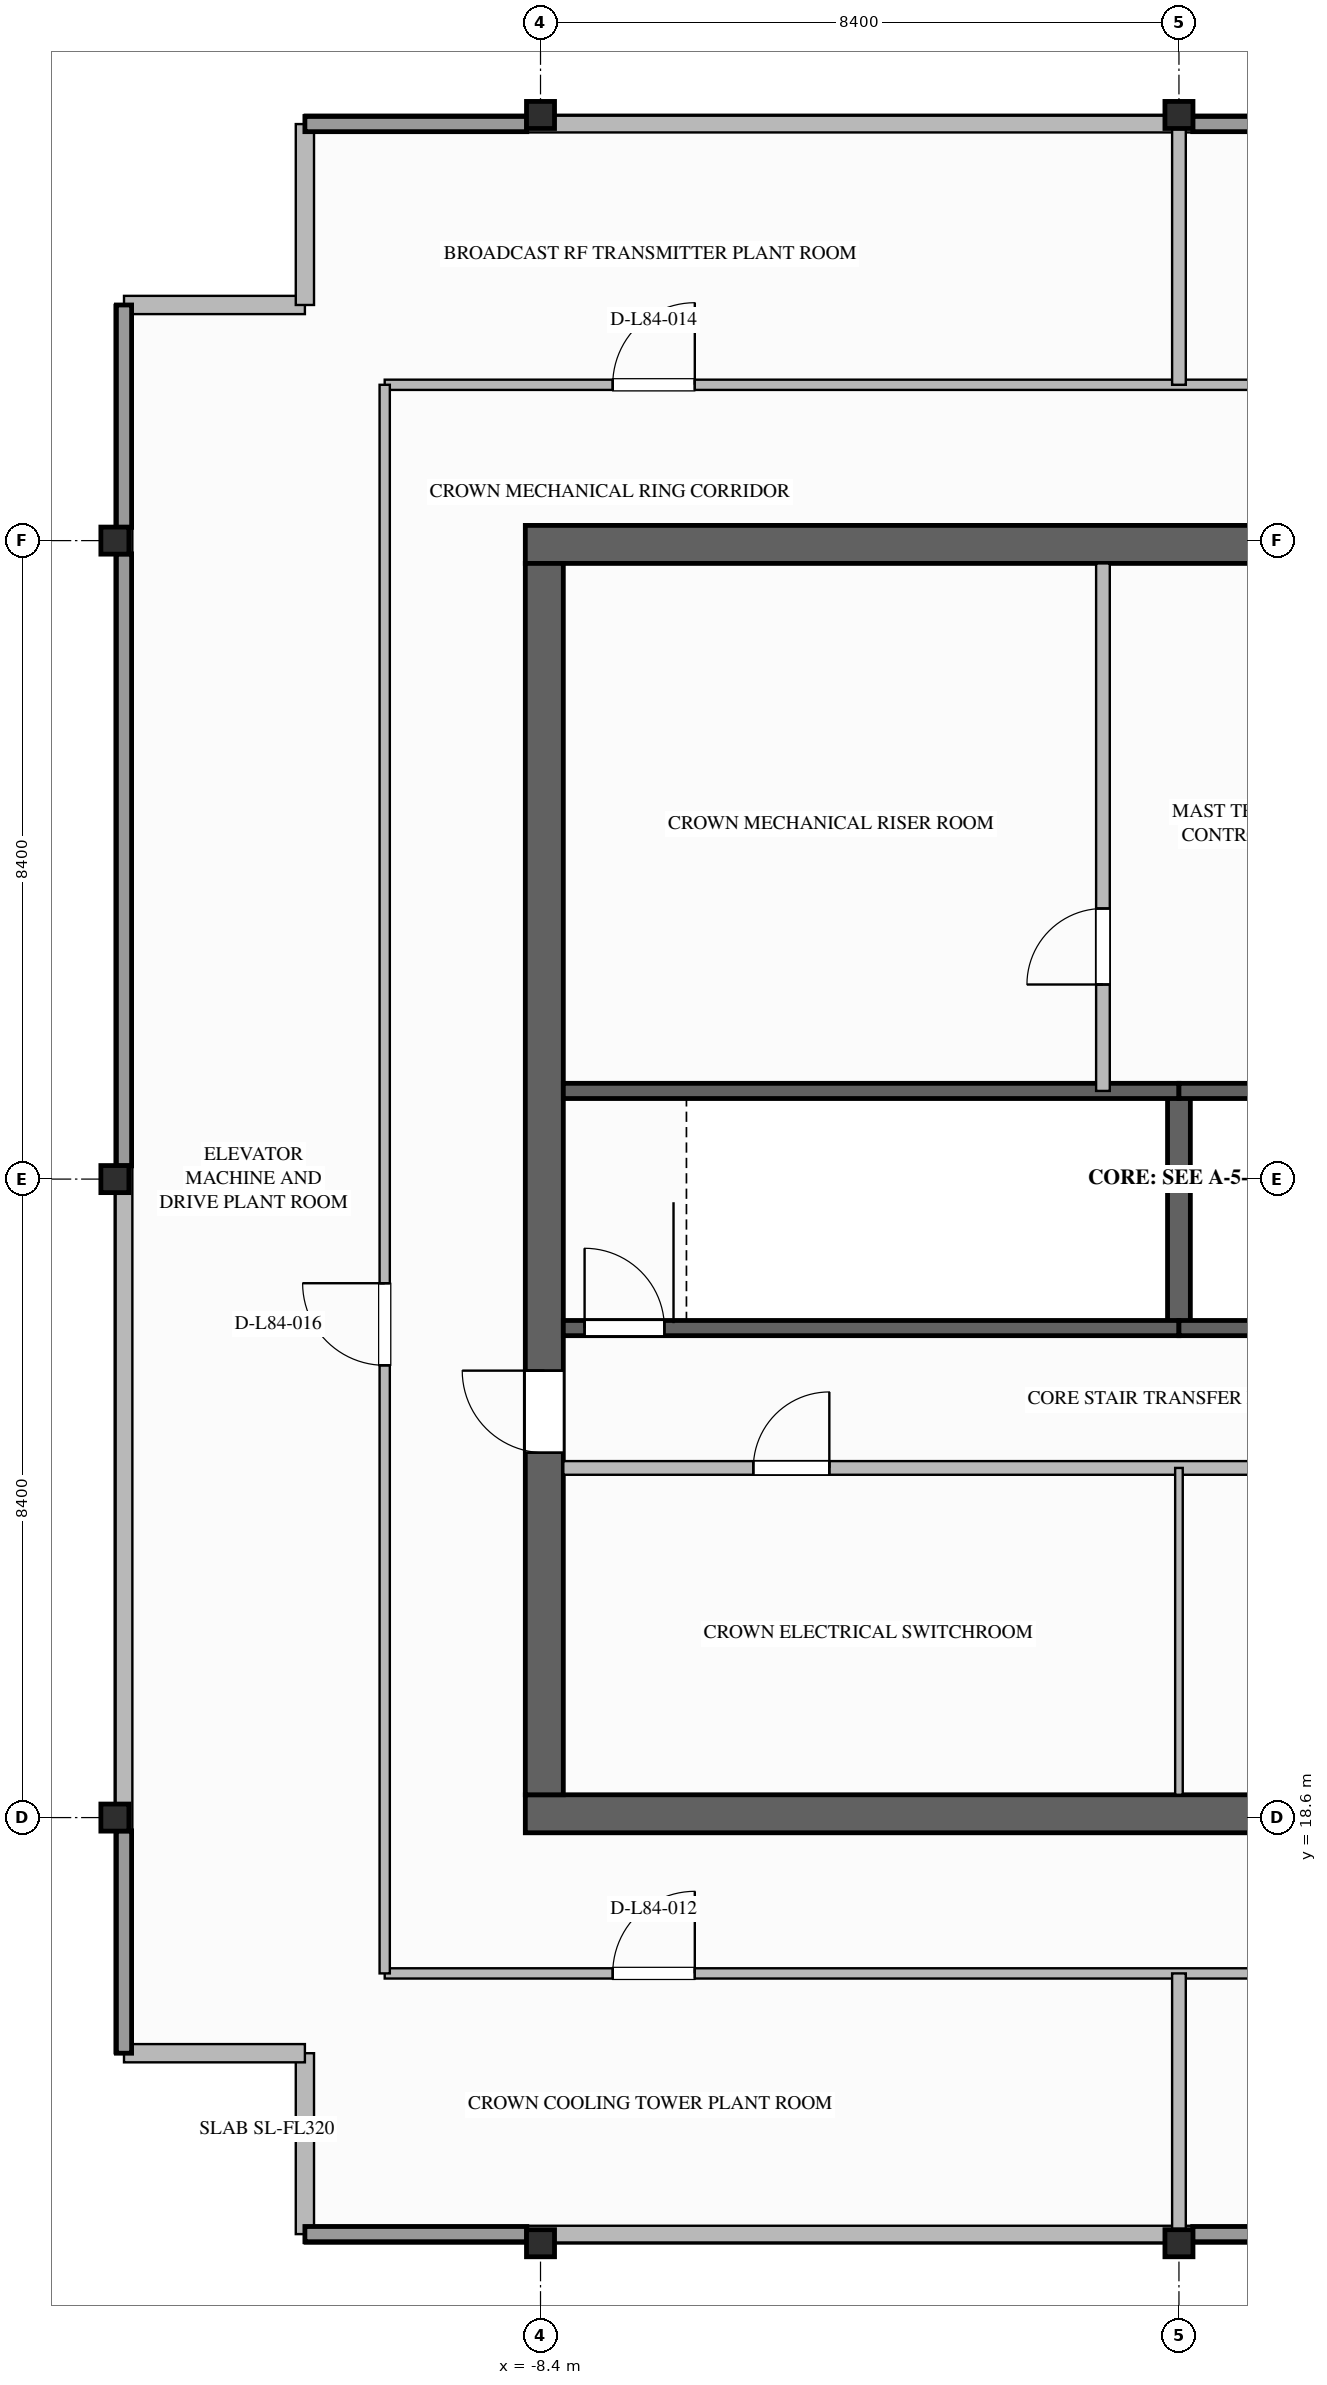
"""IFC4 building model, lengths in metres.
Left out: names, types, materials, properties, quantities, classifications, styles, units other than length and angle.
Written with IfcOpenShell. Run it as: python <this file> out.ifc"""

import sys

from ifc_helpers import new_model, si_unit, direction, frame, frame_2d, origin, origin_2d, place, context, subcontext, project, spatial, rectangle, i_section, extrude, element, fill, save


model = new_model("IFC4")
c1 = context("Model", 3, precision=1e-05, world=origin(), true_north=direction((0.0, 1.0)))
c2 = subcontext(c1, "Body", "Model", "MODEL_VIEW")
j1 = project(units=[si_unit("LENGTHUNIT", "METRE"), si_unit("PLANEANGLEUNIT", "RADIAN")], contexts=[c1])
p1 = place(None, origin())
s1 = spatial("IfcSite", under=j1, at=p1, CompositionType="ELEMENT")
p2 = place(p1, origin())
s2 = spatial("IfcBuilding", under=s1, at=p2, CompositionType="ELEMENT")
p3 = place(p2, frame((0.0, 0.0, 323.2)))
s3 = spatial("IfcBuildingStorey", under=s2, at=p3, CompositionType="ELEMENT", Elevation=323.2)
for number, where, z_axis, x_axis in (
    (1, (-8.6, 35.35, 0.0), (0.0, 0.0, 1.0), (1.0, 0.0, 0.0)),
    (2, (8.6, 18.65, 0.0), (0.0, 0.0, 1.0), (-1.0, 0.0, 0.0)),
):
    element("IfcWall", number, at=place(p3, frame(where, z_axis=z_axis, x_axis=x_axis)), inside=s3, PredefinedType="SHEAR", context=c2, shape_type="SweptSolid", body=[
        extrude(rectangle(XDim=17.2, YDim=0.5, at=frame_2d((8.6, 0.0))), origin(), (0.0, 0.0, 1.0), 3.42),
    ])
p4 = place(p3, frame((-8.35, 18.9, 0.0), z_axis=(0.0, 0.0, 1.0), x_axis=(0.0, 1.0, 0.0)))
e3 = element("IfcWall", 3, at=p4, inside=s3, PredefinedType="SHEAR", context=c2, shape_type="SweptSolid", body=[
    extrude(rectangle(XDim=16.2, YDim=0.5, at=frame_2d((8.1, 0.0))), origin(), (0.0, 0.0, 1.0), 3.42),
])
p5 = place(p4, frame((4.5, 0.0, 0.0)))
e4 = element("IfcOpeningElement", 4, at=p5, cuts=e3, PredefinedType="OPENING", context=c2, shape_type="SweptSolid", body=[
    extrude(rectangle(XDim=1.08, YDim=2.04, at=frame_2d((0.54, 1.02))), frame((0.0, 0.26, 0.0), z_axis=(0.0, -1.0, 0.0), x_axis=(1.0, 0.0, 0.0)), (0.0, 0.0, 1.0), 0.52),
])
for number, where, z_axis, x_axis in (
    (5, (-14.0, 18.6, 0.0), (0.0, 0.0, 1.0), (1.0, 0.0, 0.0)),
    (6, (-14.0, 27.0, 0.0), (0.0, 0.0, 1.0), (1.0, 0.0, 0.0)),
    (7, (-14.0, 35.4, 0.0), (0.0, 0.0, 1.0), (1.0, 0.0, 0.0)),
    (8, (-8.4, 13.0, 0.0), (0.0, 0.0, 1.0), (1.0, 0.0, 0.0)),
    (9, (0.0, 13.0, 0.0), (0.0, 0.0, 1.0), (1.0, 0.0, 0.0)),
    (10, (-8.4, 41.0, 0.0), (0.0, 0.0, 1.0), (1.0, 0.0, 0.0)),
    (11, (0.0, 41.0, 0.0), (0.0, 0.0, 1.0), (1.0, 0.0, 0.0)),
):
    element("IfcColumn", number, at=place(p3, frame(where, z_axis=z_axis, x_axis=x_axis)), inside=s3, PredefinedType="COLUMN", context=c2, shape_type="SweptSolid", body=[
        extrude(i_section(OverallWidth=0.369, OverallDepth=0.356, WebThickness=0.011, FlangeThickness=0.018, FilletRadius=0.025, at=origin_2d()), origin(), (0.0, 0.0, 1.0), 3.42),
    ])
for number, where, z_axis, x_axis in (
    (12, (-11.5, 13.12, 0.0), (0.0, 0.0, 1.0), (0.0, 1.0, 0.0)),
    (13, (-11.5, 15.5, 0.0), (0.0, 0.0, 1.0), (-1.0, 0.0, 0.0)),
    (14, (-13.88, 38.5, 0.0), (0.0, 0.0, 1.0), (1.0, 0.0, 0.0)),
    (15, (-11.5, 38.5, 0.0), (0.0, 0.0, 1.0), (0.0, 1.0, 0.0)),
):
    element("IfcWall", number, at=place(p3, frame(where, z_axis=z_axis, x_axis=x_axis)), inside=s3, PredefinedType="STANDARD", context=c2, shape_type="SweptSolid", body=[
        extrude(rectangle(XDim=2.38, YDim=0.24, at=frame_2d((1.19, 0.0))), origin(), (0.0, 0.0, 1.0), 3.42),
    ])
for number, where, z_axis, x_axis in (
    (16, (11.5, 13.12, 3.8), (0.0, 0.0, 1.0), (-1.0, 0.0, 0.0)),
    (17, (-13.88, 15.5, 3.8), (0.0, 0.0, 1.0), (0.0, 1.0, 0.0)),
    (18, (-11.5, 40.88, 3.8), (0.0, 0.0, 1.0), (1.0, 0.0, 0.0)),
):
    element("IfcWall", number, at=place(p3, frame(where, z_axis=z_axis, x_axis=x_axis)), inside=s3, PredefinedType="PARAPET", context=c2, shape_type="SweptSolid", body=[
        extrude(rectangle(XDim=23.0, YDim=0.22, at=frame_2d((11.5, 0.0))), origin(), (0.0, 0.0, 1.0), 0.95),
    ])
p6 = place(p3, frame((0.0, 25.04, 0.0), z_axis=(0.0, 0.0, 1.0), x_axis=(0.0, 1.0, 0.0)))
e19 = element("IfcWall", 19, at=p6, inside=s3, PredefinedType="SOLIDWALL", context=c2, shape_type="SweptSolid", body=[
    extrude(rectangle(XDim=3.12, YDim=0.3, at=frame_2d((1.56, 0.0))), origin(), (0.0, 0.0, 1.0), 3.42),
])
p7 = place(p3, frame((-8.1, 25.04, 0.0), z_axis=(0.0, 0.0, 1.0), x_axis=(1.0, 0.0, 0.0)))
e20 = element("IfcWall", 20, at=p7, inside=s3, PredefinedType="SOLIDWALL", context=c2, shape_type="SweptSolid", body=[
    extrude(rectangle(XDim=8.1, YDim=0.2, at=frame_2d((4.05, 0.0))), origin(), (0.0, 0.0, 1.0), 3.42),
])
p8 = place(p7, frame((0.28, 0.0, 0.0)))
e21 = element("IfcOpeningElement", 21, at=p8, cuts=e20, PredefinedType="OPENING", context=c2, shape_type="SweptSolid", body=[
    extrude(rectangle(XDim=1.05, YDim=2.1, at=frame_2d((0.525, 1.05))), frame((0.0, 0.11, 0.0), z_axis=(0.0, -1.0, 0.0), x_axis=(1.0, 0.0, 0.0)), (0.0, 0.0, 1.0), 0.22),
])
for number, where, z_axis, x_axis in (
    (22, (-8.1, 28.16, 0.0), (0.0, 0.0, 1.0), (1.0, 0.0, 0.0)),
    (23, (0.0, 25.04, 0.0), (0.0, 0.0, 1.0), (1.0, 0.0, 0.0)),
):
    element("IfcWall", number, at=place(p3, frame(where, z_axis=z_axis, x_axis=x_axis)), inside=s3, PredefinedType="SOLIDWALL", context=c2, shape_type="SweptSolid", body=[
        extrude(rectangle(XDim=8.1, YDim=0.2, at=frame_2d((4.05, 0.0))), origin(), (0.0, 0.0, 1.0), 3.42),
    ])
p9 = place(p3, frame((8.1, 28.16, 0.0), z_axis=(0.0, 0.0, 1.0), x_axis=(-1.0, 0.0, 0.0)))
e24 = element("IfcWall", 24, at=p9, inside=s3, PredefinedType="SOLIDWALL", context=c2, shape_type="SweptSolid", body=[
    extrude(rectangle(XDim=8.1, YDim=0.2, at=frame_2d((4.05, 0.0))), origin(), (0.0, 0.0, 1.0), 3.42),
])
p10 = place(p9, frame((0.28, 0.0, 0.0)))
e25 = element("IfcOpeningElement", 25, at=p10, cuts=e24, PredefinedType="OPENING", context=c2, shape_type="SweptSolid", body=[
    extrude(rectangle(XDim=1.05, YDim=2.1, at=frame_2d((0.525, 1.05))), frame((0.0, 0.11, 0.0), z_axis=(0.0, -1.0, 0.0), x_axis=(1.0, 0.0, 0.0)), (0.0, 0.0, 1.0), 0.22),
])
p11 = place(p3, frame((-1.0, 28.16, 0.0), z_axis=(0.0, 0.0, 1.0), x_axis=(0.0, 1.0, 0.0)))
e26 = element("IfcWall", 26, at=p11, inside=s3, PredefinedType="SOLIDWALL", context=c2, shape_type="SweptSolid", body=[
    extrude(rectangle(XDim=6.94, YDim=0.18, at=frame_2d((3.47, 0.0))), origin(), (0.0, 0.0, 1.0), 3.42),
])
p12 = place(p11, frame((1.4, 0.0, 0.0)))
e27 = element("IfcOpeningElement", 27, at=p12, cuts=e26, PredefinedType="OPENING", context=c2, shape_type="SweptSolid", body=[
    extrude(rectangle(XDim=1.0, YDim=2.1, at=frame_2d((0.5, 1.05))), frame((0.0, 0.1, 0.0), z_axis=(0.0, -1.0, 0.0), x_axis=(1.0, 0.0, 0.0)), (0.0, 0.0, 1.0), 0.2),
])
p13 = place(p3, frame((-8.1, 23.2, 0.0), z_axis=(0.0, 0.0, 1.0), x_axis=(1.0, 0.0, 0.0)))
e28 = element("IfcWall", 28, at=p13, inside=s3, PredefinedType="SOLIDWALL", context=c2, shape_type="SweptSolid", body=[
    extrude(rectangle(XDim=16.2, YDim=0.18, at=frame_2d((8.1, 0.0))), origin(), (0.0, 0.0, 1.0), 2.368),
])
p14 = place(p13, frame((2.5, 0.0, 0.0)))
e29 = element("IfcOpeningElement", 29, at=p14, cuts=e28, PredefinedType="OPENING", context=c2, shape_type="SweptSolid", body=[
    extrude(rectangle(XDim=1.0, YDim=2.1, at=frame_2d((0.5, 1.05))), frame((0.0, 0.1, 0.0), z_axis=(0.0, -1.0, 0.0), x_axis=(1.0, 0.0, 0.0)), (0.0, 0.0, 1.0), 0.2),
])
p15 = place(p13, frame((11.0, 0.0, 0.0)))
e30 = element("IfcOpeningElement", 30, at=p15, cuts=e28, PredefinedType="OPENING", context=c2, shape_type="SweptSolid", body=[
    extrude(rectangle(XDim=1.0, YDim=2.1, at=frame_2d((0.5, 1.05))), frame((0.0, 0.1, 0.0), z_axis=(0.0, -1.0, 0.0), x_axis=(1.0, 0.0, 0.0)), (0.0, 0.0, 1.0), 0.2),
])
p16 = place(p3, frame((0.0, 18.9, 0.0), z_axis=(0.0, 0.0, 1.0), x_axis=(0.0, 1.0, 0.0)))
e31 = element("IfcWall", 31, at=p16, inside=s3, PredefinedType="PARTITIONING", context=c2, shape_type="SweptSolid", body=[
    extrude(rectangle(XDim=4.3, YDim=0.1, at=frame_2d((2.15, 0.0))), origin(), (0.0, 0.0, 1.0), 3.42),
])
p17 = place(p3, frame((-10.45, 16.55, 0.0), z_axis=(0.0, 0.0, 1.0), x_axis=(1.0, 0.0, 0.0)))
e32 = element("IfcWall", 32, at=p17, inside=s3, PredefinedType="PARTITIONING", context=c2, shape_type="SweptSolid", body=[
    extrude(rectangle(XDim=20.9, YDim=0.135, at=frame_2d((10.45, 0.0))), origin(), (0.0, 0.0, 1.0), 3.42),
])
p18 = place(p17, frame((3.0, 0.0, 0.0)))
e33 = element("IfcOpeningElement", 33, at=p18, cuts=e32, PredefinedType="OPENING", context=c2, shape_type="SweptSolid", body=[
    extrude(rectangle(XDim=1.08, YDim=2.04, at=frame_2d((0.54, 1.02))), frame((0.0, 0.077, 0.0), z_axis=(0.0, -1.0, 0.0), x_axis=(1.0, 0.0, 0.0)), (0.0, 0.0, 1.0), 0.155),
])
p19 = place(p17, frame((15.0, 0.0, 0.0)))
e34 = element("IfcOpeningElement", 34, at=p19, cuts=e32, PredefinedType="OPENING", context=c2, shape_type="SweptSolid", body=[
    extrude(rectangle(XDim=1.08, YDim=2.04, at=frame_2d((0.54, 1.02))), frame((0.0, 0.077, 0.0), z_axis=(0.0, -1.0, 0.0), x_axis=(1.0, 0.0, 0.0)), (0.0, 0.0, 1.0), 0.155),
])
p20 = place(p3, frame((-10.45, 37.45, 0.0), z_axis=(0.0, 0.0, 1.0), x_axis=(1.0, 0.0, 0.0)))
e35 = element("IfcWall", 35, at=p20, inside=s3, PredefinedType="PARTITIONING", context=c2, shape_type="SweptSolid", body=[
    extrude(rectangle(XDim=20.9, YDim=0.135, at=frame_2d((10.45, 0.0))), origin(), (0.0, 0.0, 1.0), 3.42),
])
p21 = place(p20, frame((3.0, 0.0, 0.0)))
e36 = element("IfcOpeningElement", 36, at=p21, cuts=e35, PredefinedType="OPENING", context=c2, shape_type="SweptSolid", body=[
    extrude(rectangle(XDim=1.08, YDim=2.04, at=frame_2d((0.54, 1.02))), frame((0.0, 0.077, 0.0), z_axis=(0.0, -1.0, 0.0), x_axis=(1.0, 0.0, 0.0)), (0.0, 0.0, 1.0), 0.155),
])
p22 = place(p20, frame((15.0, 0.0, 0.0)))
e37 = element("IfcOpeningElement", 37, at=p22, cuts=e35, PredefinedType="OPENING", context=c2, shape_type="SweptSolid", body=[
    extrude(rectangle(XDim=1.08, YDim=2.04, at=frame_2d((0.54, 1.02))), frame((0.0, 0.077, 0.0), z_axis=(0.0, -1.0, 0.0), x_axis=(1.0, 0.0, 0.0)), (0.0, 0.0, 1.0), 0.155),
])
p23 = place(p3, frame((-10.45, 16.55, 0.0), z_axis=(0.0, 0.0, 1.0), x_axis=(0.0, 1.0, 0.0)))
e38 = element("IfcWall", 38, at=p23, inside=s3, PredefinedType="PARTITIONING", context=c2, shape_type="SweptSolid", body=[
    extrude(rectangle(XDim=20.9, YDim=0.135, at=frame_2d((10.45, 0.0))), origin(), (0.0, 0.0, 1.0), 3.42),
])
p24 = place(p23, frame((8.0, 0.0, 0.0)))
e39 = element("IfcOpeningElement", 39, at=p24, cuts=e38, PredefinedType="OPENING", context=c2, shape_type="SweptSolid", body=[
    extrude(rectangle(XDim=1.08, YDim=2.04, at=frame_2d((0.54, 1.02))), frame((0.0, 0.077, 0.0), z_axis=(0.0, -1.0, 0.0), x_axis=(1.0, 0.0, 0.0)), (0.0, 0.0, 1.0), 0.155),
])
for number, where, z_axis, x_axis in (
    (40, (0.0, 13.12, 0.0), (0.0, 0.0, 1.0), (0.0, 1.0, 0.0)),
    (41, (0.0, 37.45, 0.0), (0.0, 0.0, 1.0), (0.0, 1.0, 0.0)),
):
    element("IfcWall", number, at=place(p3, frame(where, z_axis=z_axis, x_axis=x_axis)), inside=s3, PredefinedType="SOLIDWALL", context=c2, shape_type="SweptSolid", body=[
        extrude(rectangle(XDim=3.43, YDim=0.18, at=frame_2d((1.715, 0.0))), origin(), (0.0, 0.0, 1.0), 2.868),
    ])
p25 = place(p8, origin())
e42 = element("IfcDoor", 42, at=p25, inside=s3, OperationType="SINGLE_SWING_LEFT", PredefinedType="DOOR", context=c2, shape_type="SweptSolid", body=[
    extrude(rectangle(XDim=1.05, YDim=2.1, at=frame_2d((0.525, 1.05))), frame((0.0, 0.025, 0.0), z_axis=(0.0, -1.0, 0.0), x_axis=(1.0, 0.0, 0.0)), (0.0, 0.0, 1.0), 0.05),
])
fill(e21, e42)
p26 = place(p12, origin())
e43 = element("IfcDoor", 43, at=p26, inside=s3, OperationType="SINGLE_SWING_LEFT", PredefinedType="DOOR", context=c2, shape_type="SweptSolid", body=[
    extrude(rectangle(XDim=1.0, YDim=2.1, at=frame_2d((0.5, 1.05))), frame((0.0, 0.025, 0.0), z_axis=(0.0, -1.0, 0.0), x_axis=(1.0, 0.0, 0.0)), (0.0, 0.0, 1.0), 0.05),
])
fill(e27, e43)
p27 = place(p5, origin())
e44 = element("IfcDoor", 44, at=p27, inside=s3, OperationType="SINGLE_SWING_RIGHT", PredefinedType="DOOR", context=c2, shape_type="SweptSolid", body=[
    extrude(rectangle(XDim=1.08, YDim=2.04, at=frame_2d((0.54, 1.02))), frame((0.0, 0.025, 0.0), z_axis=(0.0, -1.0, 0.0), x_axis=(1.0, 0.0, 0.0)), (0.0, 0.0, 1.0), 0.05),
])
fill(e4, e44)
p28 = place(p14, origin())
e45 = element("IfcDoor", 45, at=p28, inside=s3, OperationType="SINGLE_SWING_RIGHT", PredefinedType="DOOR", context=c2, shape_type="SweptSolid", body=[
    extrude(rectangle(XDim=1.0, YDim=2.1, at=frame_2d((0.5, 1.05))), frame((0.0, 0.025, 0.0), z_axis=(0.0, -1.0, 0.0), x_axis=(1.0, 0.0, 0.0)), (0.0, 0.0, 1.0), 0.05),
])
fill(e29, e45)
p29 = place(p18, origin())
e46 = element("IfcDoor", 46, at=p29, inside=s3, OperationType="SINGLE_SWING_RIGHT", PredefinedType="DOOR", context=c2, shape_type="SweptSolid", body=[
    extrude(rectangle(XDim=1.08, YDim=2.04, at=frame_2d((0.54, 1.02))), frame((0.0, 0.025, 0.0), z_axis=(0.0, -1.0, 0.0), x_axis=(1.0, 0.0, 0.0)), (0.0, 0.0, 1.0), 0.05),
])
fill(e33, e46)
p30 = place(p21, origin())
e47 = element("IfcDoor", 47, at=p30, inside=s3, OperationType="SINGLE_SWING_RIGHT", PredefinedType="DOOR", context=c2, shape_type="SweptSolid", body=[
    extrude(rectangle(XDim=1.08, YDim=2.04, at=frame_2d((0.54, 1.02))), frame((0.0, 0.025, 0.0), z_axis=(0.0, -1.0, 0.0), x_axis=(1.0, 0.0, 0.0)), (0.0, 0.0, 1.0), 0.05),
])
fill(e36, e47)
p31 = place(p24, origin())
e48 = element("IfcDoor", 48, at=p31, inside=s3, OperationType="SINGLE_SWING_RIGHT", PredefinedType="DOOR", context=c2, shape_type="SweptSolid", body=[
    extrude(rectangle(XDim=1.08, YDim=2.04, at=frame_2d((0.54, 1.02))), frame((0.0, 0.025, 0.0), z_axis=(0.0, -1.0, 0.0), x_axis=(1.0, 0.0, 0.0)), (0.0, 0.0, 1.0), 0.05),
])
fill(e39, e48)
save(model, sys.argv[1])
